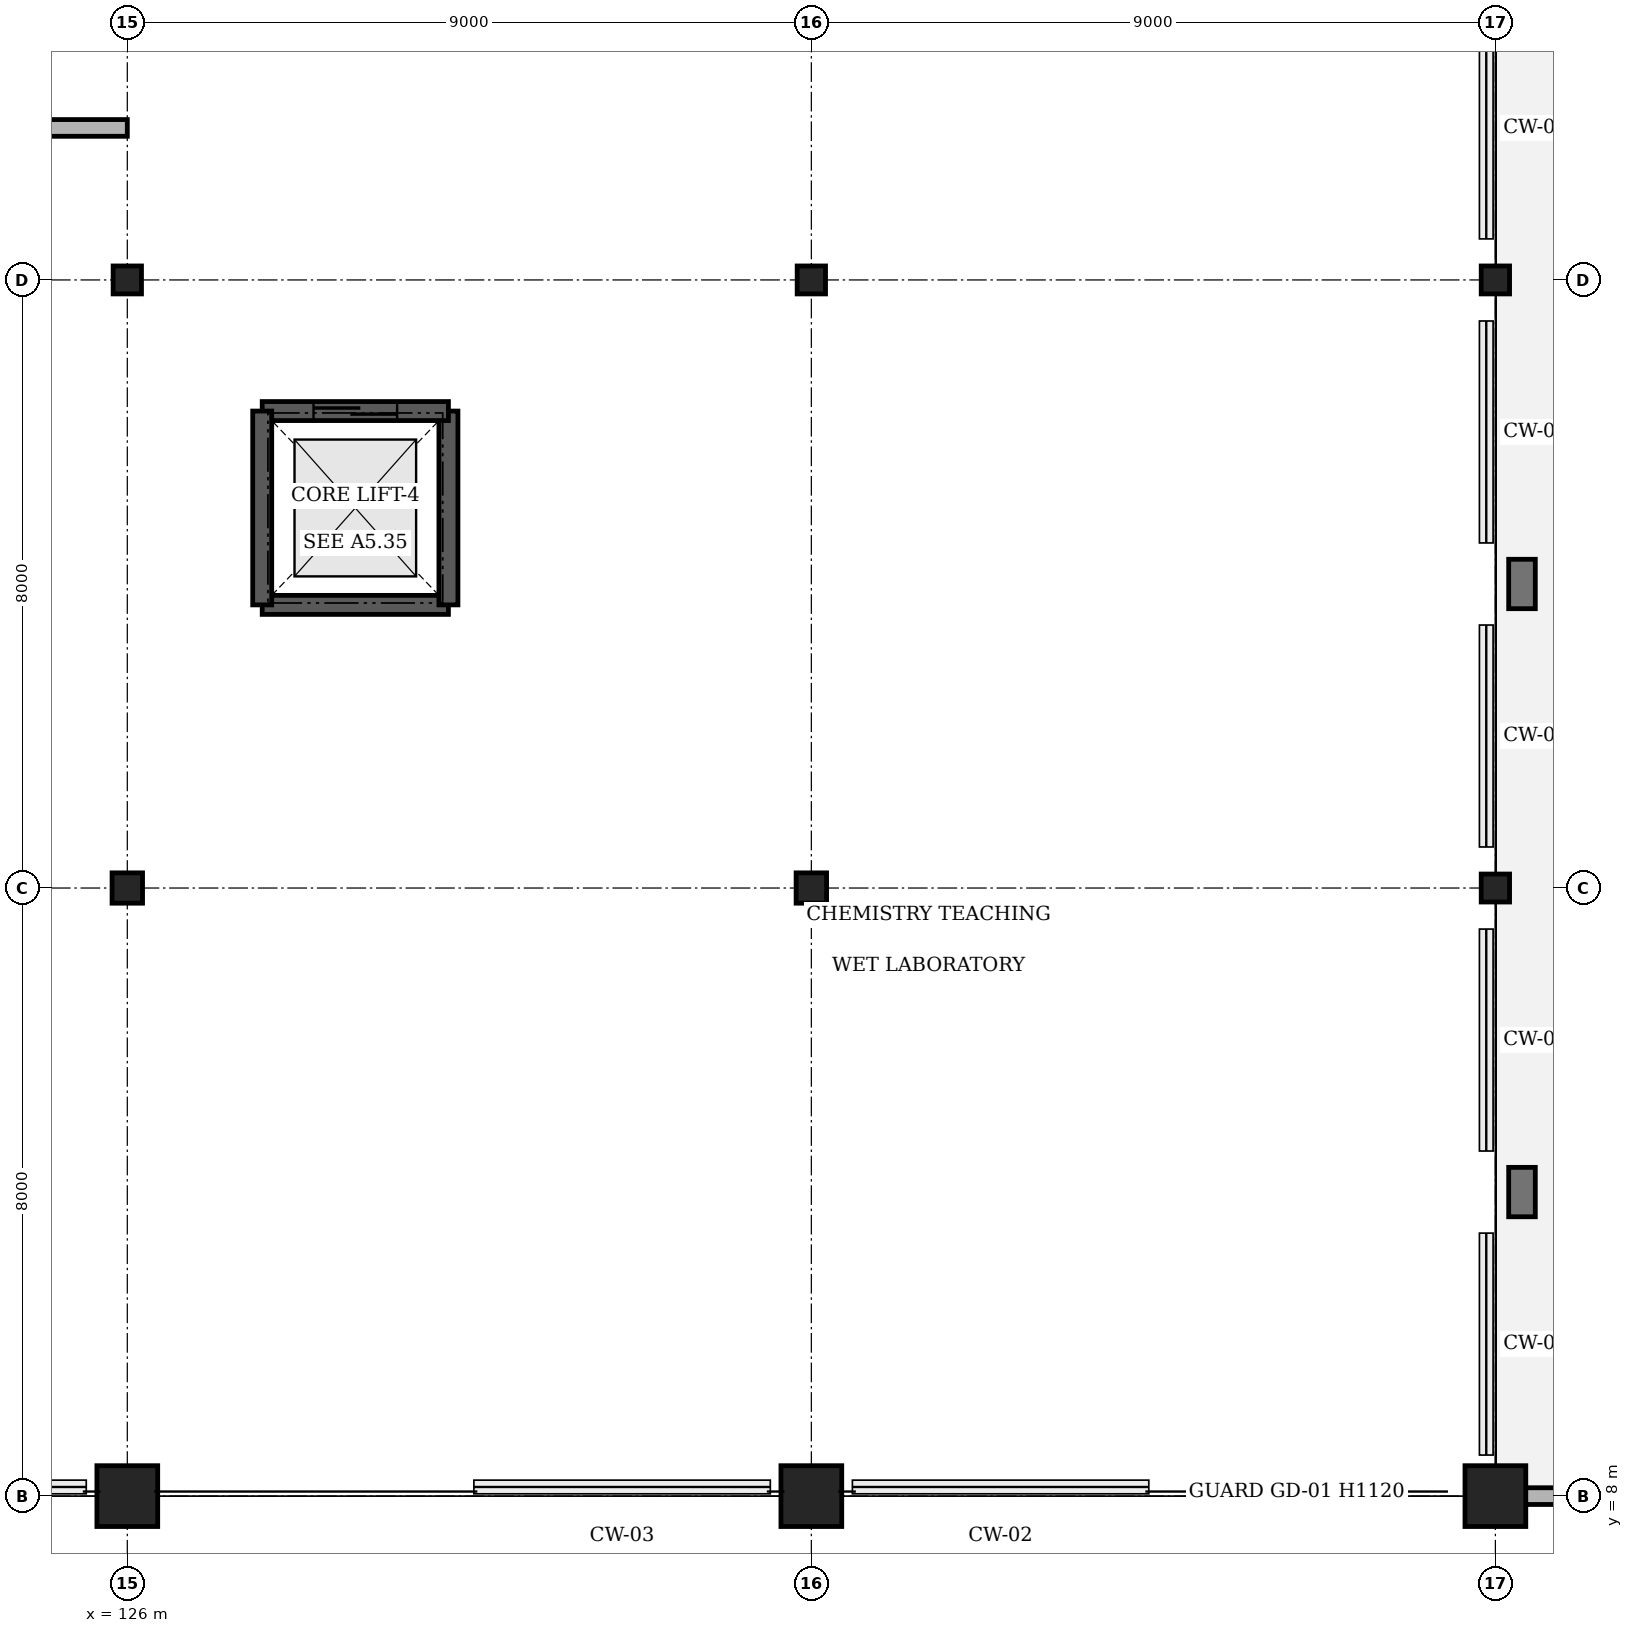
"""IFC4 building model, lengths in metres.
Left out: names, types, materials, properties, quantities, classifications, styles, units other than length and angle.
Written with IfcOpenShell. Run it as: python <this file> out.ifc"""

import sys

from ifc_helpers import new_model, si_unit, direction, frame, frame_2d, origin, origin_2d, place, context, subcontext, project, spatial, rectangle, circle, i_section, extrude, element, fill, save


model = new_model("IFC4")
c1 = context("Model", 3, precision=1e-05, world=origin(), true_north=direction((0.0, 1.0)))
c2 = subcontext(c1, "Body", "Model", "MODEL_VIEW")
j1 = project(units=[si_unit("LENGTHUNIT", "METRE"), si_unit("PLANEANGLEUNIT", "RADIAN")], contexts=[c1])
p1 = place(None, origin())
s1 = spatial("IfcSite", under=j1, at=p1, CompositionType="ELEMENT")
p2 = place(p1, origin())
s2 = spatial("IfcBuilding", under=s1, at=p2, CompositionType="ELEMENT")
p3 = place(p2, frame((0.0, 0.0, 5.4)))
s3 = spatial("IfcBuildingStorey", under=s2, at=p3, CompositionType="ELEMENT", Elevation=5.4)
p4 = place(p3, frame((126.0, 8.0, 0.0), z_axis=(0.0, 0.0, 1.0), x_axis=(1.0, 0.0, 0.0)))
e1 = element("IfcColumn", 1, at=p4, inside=s3, PredefinedType="COLUMN", context=c2, shape_type="SweptSolid", body=[
    extrude(circle(Radius=0.4, at=origin_2d()), origin(), (0.0, 0.0, 1.0), 5.4),
])
p5 = place(p3, frame((126.0, 16.0, 0.0), z_axis=(0.0, 0.0, 1.0), x_axis=(1.0, 0.0, 0.0)))
e2 = element("IfcColumn", 2, at=p5, inside=s3, PredefinedType="COLUMN", context=c2, shape_type="SweptSolid", body=[
    extrude(i_section(OverallWidth=0.401, OverallDepth=0.399, WebThickness=0.025, FlangeThickness=0.04, FilletRadius=0.015, at=origin_2d()), origin(), (0.0, 0.0, 1.0), 5.4),
])
p6 = place(p3, frame((126.0, 24.0, 0.0), z_axis=(0.0, 0.0, 1.0), x_axis=(1.0, 0.0, 0.0)))
e3 = element("IfcColumn", 3, at=p6, inside=s3, PredefinedType="COLUMN", context=c2, shape_type="SweptSolid", body=[
    extrude(i_section(OverallWidth=0.373, OverallDepth=0.368, WebThickness=0.015, FlangeThickness=0.024, FilletRadius=0.015, at=origin_2d()), origin(), (0.0, 0.0, 1.0), 5.4),
])
p7 = place(p3, frame((135.0, 8.0, 0.0), z_axis=(0.0, 0.0, 1.0), x_axis=(1.0, 0.0, 0.0)))
e4 = element("IfcColumn", 4, at=p7, inside=s3, PredefinedType="COLUMN", context=c2, shape_type="SweptSolid", body=[
    extrude(circle(Radius=0.4, at=origin_2d()), origin(), (0.0, 0.0, 1.0), 5.4),
])
p8 = place(p3, frame((135.0, 16.0, 0.0), z_axis=(0.0, 0.0, 1.0), x_axis=(1.0, 0.0, 0.0)))
e5 = element("IfcColumn", 5, at=p8, inside=s3, PredefinedType="COLUMN", context=c2, shape_type="SweptSolid", body=[
    extrude(i_section(OverallWidth=0.401, OverallDepth=0.399, WebThickness=0.025, FlangeThickness=0.04, FilletRadius=0.015, at=origin_2d()), origin(), (0.0, 0.0, 1.0), 5.4),
])
p9 = place(p3, frame((135.0, 24.0, 0.0), z_axis=(0.0, 0.0, 1.0), x_axis=(1.0, 0.0, 0.0)))
e6 = element("IfcColumn", 6, at=p9, inside=s3, PredefinedType="COLUMN", context=c2, shape_type="SweptSolid", body=[
    extrude(i_section(OverallWidth=0.373, OverallDepth=0.368, WebThickness=0.015, FlangeThickness=0.024, FilletRadius=0.015, at=origin_2d()), origin(), (0.0, 0.0, 1.0), 5.4),
])
p10 = place(p3, frame((144.0, 8.0, 0.0), z_axis=(0.0, 0.0, 1.0), x_axis=(1.0, 0.0, 0.0)))
e7 = element("IfcColumn", 7, at=p10, inside=s3, PredefinedType="COLUMN", context=c2, shape_type="SweptSolid", body=[
    extrude(circle(Radius=0.4, at=origin_2d()), origin(), (0.0, 0.0, 1.0), 5.4),
])
for number, where, z_axis, x_axis in (
    (8, (144.0, 16.0, 0.0), (0.0, 0.0, 1.0), (1.0, 0.0, 0.0)),
    (9, (144.0, 24.0, 0.0), (0.0, 0.0, 1.0), (1.0, 0.0, 0.0)),
):
    element("IfcColumn", number, at=place(p3, frame(where, z_axis=z_axis, x_axis=x_axis)), inside=s3, PredefinedType="COLUMN", context=c2, shape_type="SweptSolid", body=[
        extrude(i_section(OverallWidth=0.373, OverallDepth=0.368, WebThickness=0.015, FlangeThickness=0.024, FilletRadius=0.015, at=origin_2d()), origin(), (0.0, 0.0, 1.0), 5.4),
    ])
for number, where, z_axis, x_axis in (
    (10, (144.35, 12.0, 0.0), (0.0, 0.0, 1.0), (0.0, 1.0, 0.0)),
    (11, (144.35, 20.0, 0.0), (0.0, 0.0, 1.0), (0.0, 1.0, 0.0)),
):
    element("IfcColumn", number, at=place(p3, frame(where, z_axis=z_axis, x_axis=x_axis)), inside=s3, PredefinedType="PILASTER", context=c2, shape_type="SweptSolid", body=[
        extrude(rectangle(XDim=0.65, YDim=0.35, at=origin_2d()), origin(), (0.0, 0.0, 1.0), 5.4),
    ])
p11 = place(p3, frame((144.0, 8.0, 0.0), z_axis=(0.0, 0.0, 1.0), x_axis=(1.0, 0.0, 0.0)))
e12 = element("IfcWall", 12, at=p11, inside=s3, PredefinedType="PARAPET", context=c2, shape_type="SweptSolid", body=[
    extrude(rectangle(XDim=9.0, YDim=0.22, at=frame_2d((4.5, 0.0))), origin(), (0.0, 0.0, 1.0), 1.1),
])
p12 = place(p3, frame((127.775, 19.725, 0.0), z_axis=(0.0, 0.0, 1.0), x_axis=(1.0, 0.0, 0.0)))
e13 = element("IfcWall", 13, at=p12, inside=s3, PredefinedType="SOLIDWALL", context=c2, shape_type="SweptSolid", body=[
    extrude(rectangle(XDim=2.45, YDim=0.25, at=frame_2d((1.225, 0.0))), origin(), (0.0, 0.0, 1.0), 5.4),
])
p13 = place(p3, frame((130.225, 19.725, 0.0), z_axis=(0.0, 0.0, 1.0), x_axis=(0.0, 1.0, 0.0)))
e14 = element("IfcWall", 14, at=p13, inside=s3, PredefinedType="SOLIDWALL", context=c2, shape_type="SweptSolid", body=[
    extrude(rectangle(XDim=2.55, YDim=0.25, at=frame_2d((1.275, 0.0))), origin(), (0.0, 0.0, 1.0), 5.4),
])
p14 = place(p3, frame((130.225, 22.275, 0.0), z_axis=(0.0, 0.0, 1.0), x_axis=(-1.0, 0.0, 0.0)))
e15 = element("IfcWall", 15, at=p14, inside=s3, PredefinedType="SOLIDWALL", context=c2, shape_type="SweptSolid", body=[
    extrude(rectangle(XDim=2.45, YDim=0.25, at=frame_2d((1.225, 0.0))), origin(), (0.0, 0.0, 1.0), 5.4),
])
p15 = place(p14, frame((0.675, 0.0, 0.0)))
e16 = element("IfcOpeningElement", 16, at=p15, cuts=e15, PredefinedType="OPENING", context=c2, shape_type="SweptSolid", body=[
    extrude(rectangle(XDim=1.1, YDim=2.2, at=frame_2d((0.55, 1.1))), frame((0.0, 0.135, 0.0), z_axis=(0.0, -1.0, 0.0), x_axis=(1.0, 0.0, 0.0)), (0.0, 0.0, 1.0), 0.27),
])
p16 = place(p3, frame((127.775, 22.275, 0.0), z_axis=(0.0, 0.0, 1.0), x_axis=(0.0, -1.0, 0.0)))
e17 = element("IfcWall", 17, at=p16, inside=s3, PredefinedType="SOLIDWALL", context=c2, shape_type="SweptSolid", body=[
    extrude(rectangle(XDim=2.55, YDim=0.25, at=frame_2d((1.275, 0.0))), origin(), (0.0, 0.0, 1.0), 5.4),
])
p17 = place(p3, frame((110.225, 26.0, 0.0), z_axis=(0.0, 0.0, 1.0), x_axis=(1.0, 0.0, 0.0)))
e18 = element("IfcWall", 18, at=p17, inside=s3, PredefinedType="SOLIDWALL", context=c2, shape_type="SweptSolid", body=[
    extrude(rectangle(XDim=15.775, YDim=0.22, at=frame_2d((7.887, 0.0))), origin(), (0.0, 0.0, 1.0), 3.15),
])
p18 = place(p15, origin())
e19 = element("IfcDoor", 19, at=p18, inside=s3, OperationType="SLIDING_TO_LEFT", PredefinedType="DOOR", context=c2, shape_type="SweptSolid", body=[
    extrude(rectangle(XDim=1.1, YDim=2.2, at=frame_2d((0.55, 1.1))), frame((0.0, 0.025, 0.0), z_axis=(0.0, -1.0, 0.0), x_axis=(1.0, 0.0, 0.0)), (0.0, 0.0, 1.0), 0.05),
])
fill(e16, e19)
save(model, sys.argv[1])
